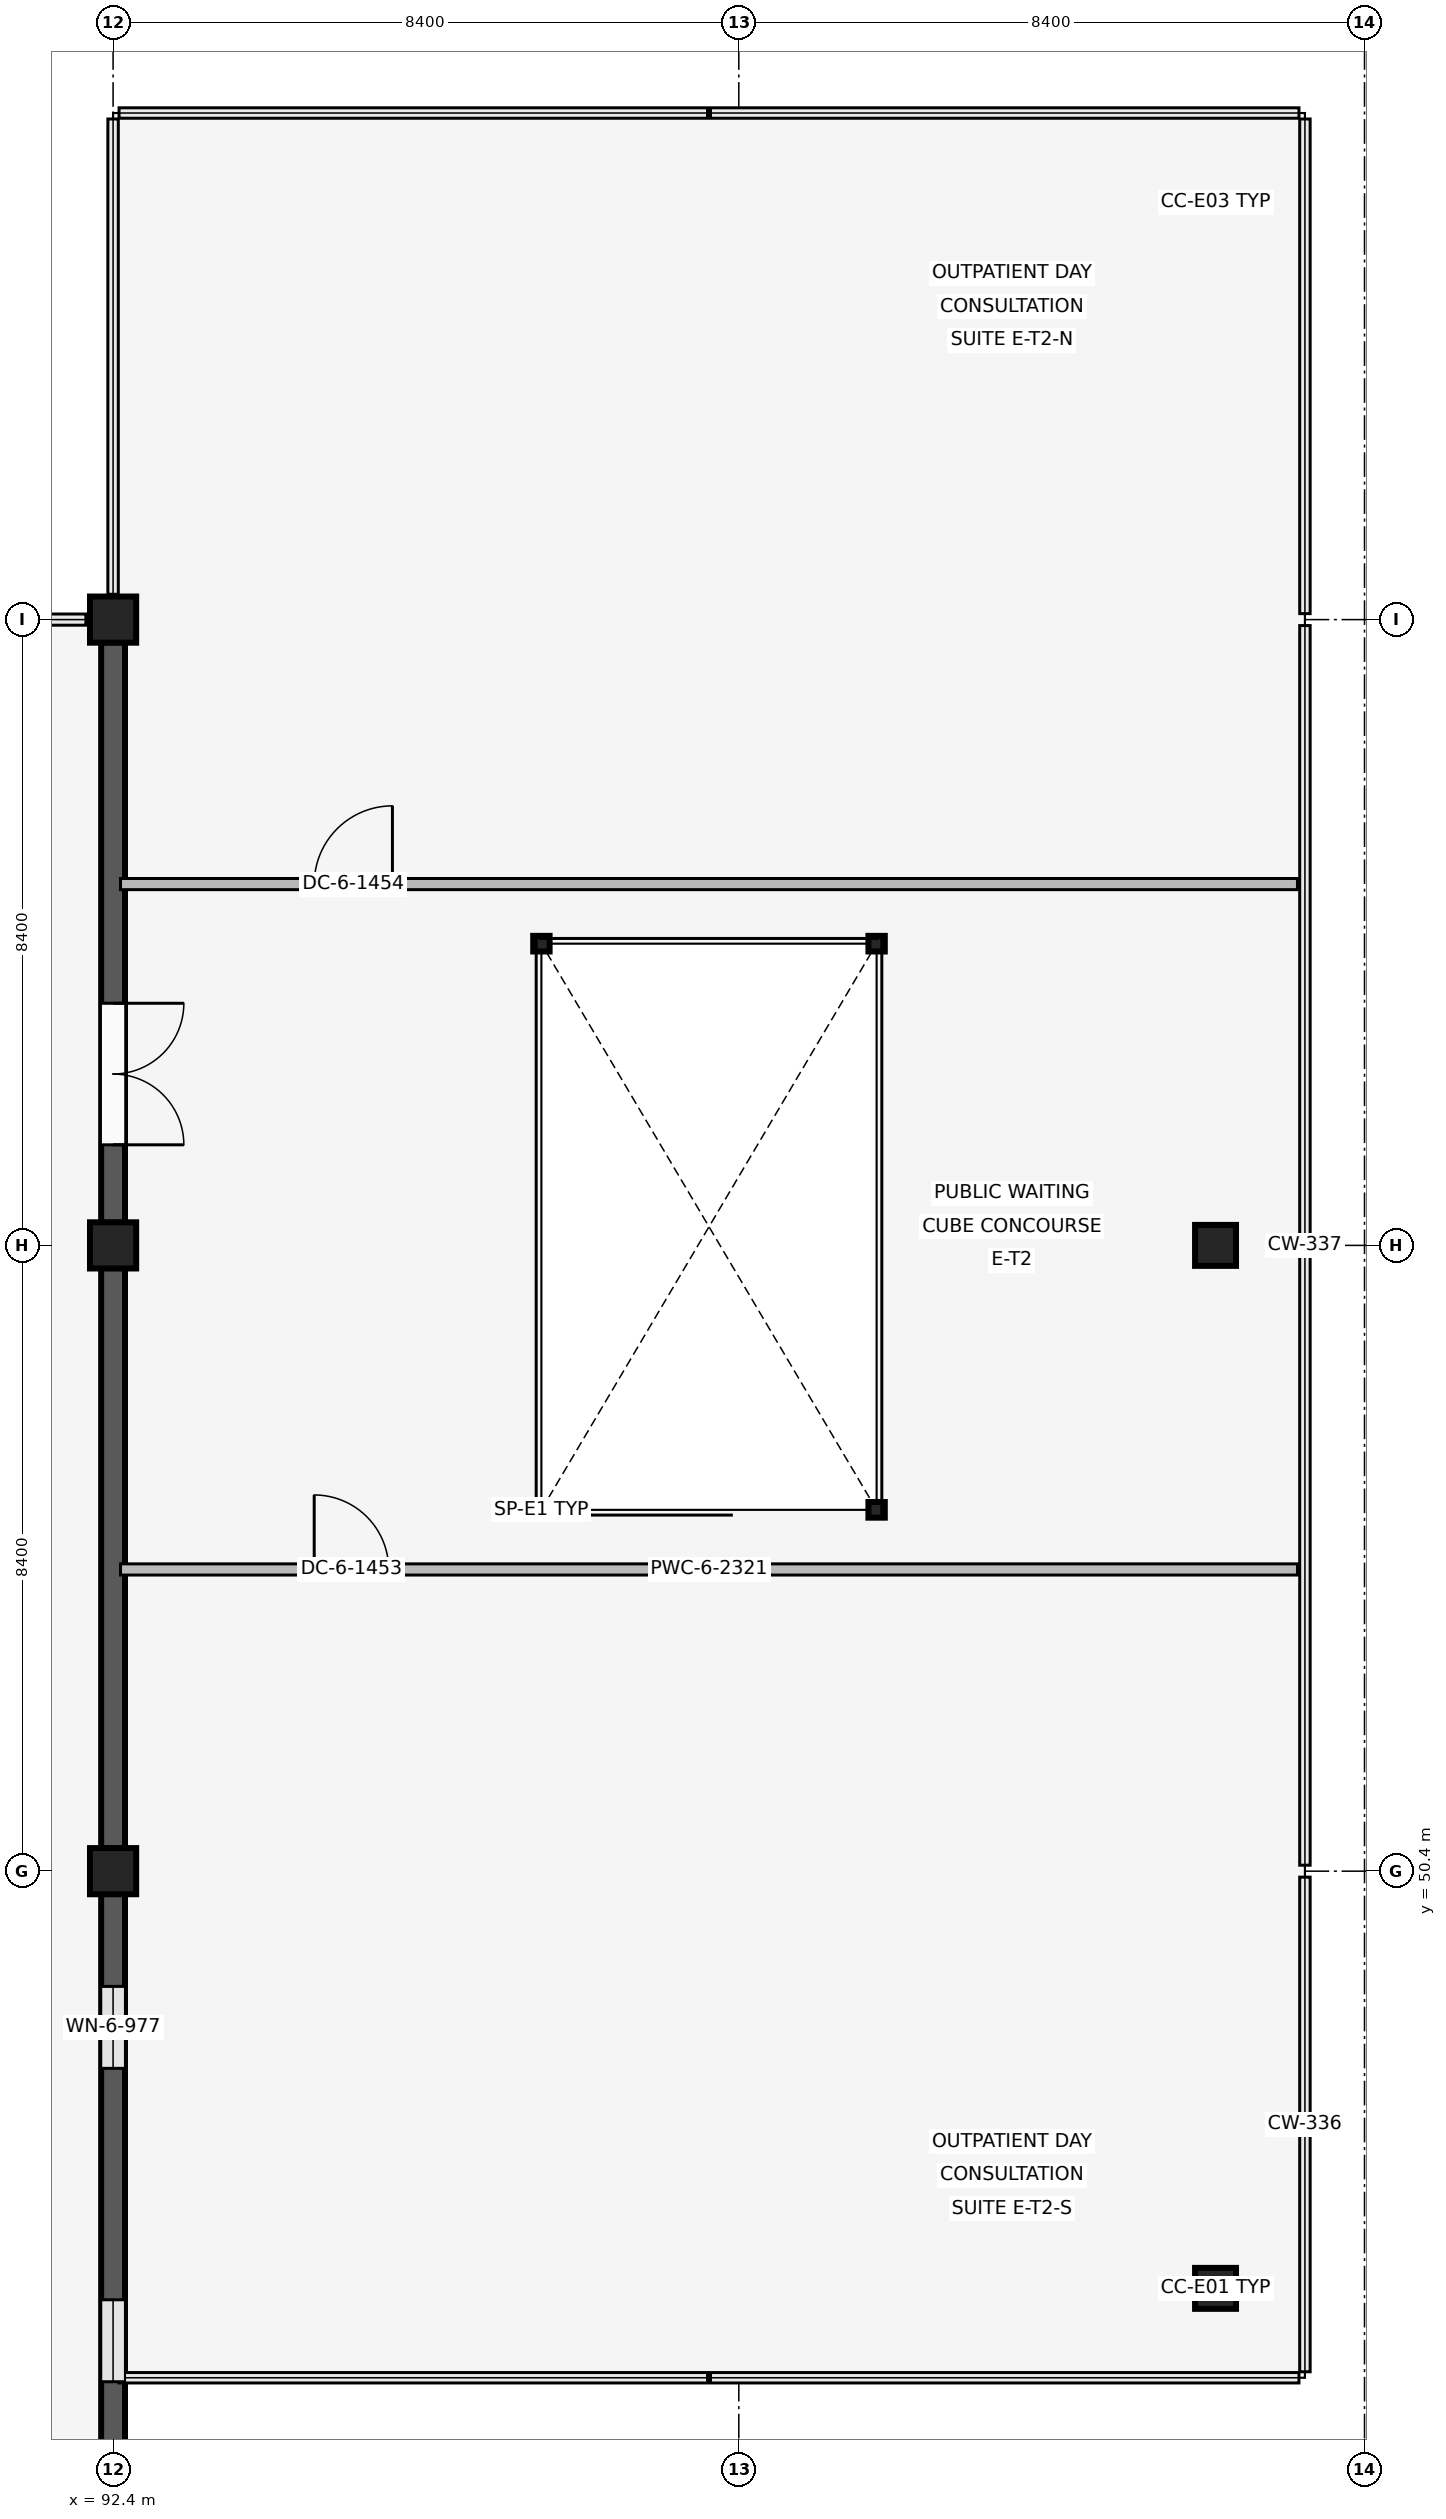
"""IFC4 building model, lengths in metres.
Left out: names, types, materials, properties, quantities, classifications, styles, units other than length and angle.
Written with IfcOpenShell. Run it as: python <this file> out.ifc"""

import sys

from ifc_helpers import new_model, si_unit, direction, frame, frame_2d, origin, origin_2d, place, context, subcontext, project, spatial, rectangle, i_section, extrude, element, fill, save


model = new_model("IFC4")
c1 = context("Model", 3, precision=1e-05, world=origin(), true_north=direction((0.0, 1.0)))
c2 = subcontext(c1, "Body", "Model", "MODEL_VIEW")
j1 = project(units=[si_unit("LENGTHUNIT", "METRE"), si_unit("PLANEANGLEUNIT", "RADIAN")], contexts=[c1])
p1 = place(None, origin())
s1 = spatial("IfcSite", under=j1, at=p1, CompositionType="ELEMENT")
p2 = place(p1, origin())
s2 = spatial("IfcBuilding", under=s1, at=p2, CompositionType="ELEMENT")
p3 = place(p2, frame((0.0, 0.0, 24.6)))
s3 = spatial("IfcBuildingStorey", under=s2, at=p3, CompositionType="ELEMENT", Elevation=24.6)
for number, where, z_axis, x_axis in (
    (1, (92.4, 50.4, 0.0), (0.0, 0.0, 1.0), (1.0, 0.0, 0.0)),
    (2, (92.4, 58.8, 0.0), (0.0, 0.0, 1.0), (1.0, 0.0, 0.0)),
    (3, (92.4, 67.2, 0.0), (0.0, 0.0, 1.0), (1.0, 0.0, 0.0)),
):
    element("IfcColumn", number, at=place(p3, frame(where, z_axis=z_axis, x_axis=x_axis)), inside=s3, PredefinedType="COLUMN", context=c2, shape_type="SweptSolid", body=[
        extrude(rectangle(XDim=0.62, YDim=0.62, at=origin_2d()), origin(), (0.0, 0.0, 1.0), 4.2),
    ])
for number, where, z_axis, x_axis in (
    (4, (107.2, 44.8, 0.0), (0.0, 0.0, 1.0), (1.0, 0.0, 0.0)),
    (5, (107.2, 58.8, 0.0), (0.0, 0.0, 1.0), (1.0, 0.0, 0.0)),
):
    element("IfcColumn", number, at=place(p3, frame(where, z_axis=z_axis, x_axis=x_axis)), inside=s3, PredefinedType="COLUMN", context=c2, shape_type="SweptSolid", body=[
        extrude(rectangle(XDim=0.55, YDim=0.55, at=origin_2d()), origin(), (0.0, 0.0, 1.0), 4.2),
    ])
p4 = place(p3, frame((107.2, 72.8, 0.0), z_axis=(0.0, 0.0, 1.0), x_axis=(1.0, 0.0, 0.0)))
e6 = element("IfcColumn", 6, at=p4, inside=s3, PredefinedType="COLUMN", context=c2, shape_type="SweptSolid", body=[
    extrude(i_section(OverallWidth=0.22, OverallDepth=0.22, WebThickness=0.01, FlangeThickness=0.016, at=origin_2d()), origin(), (0.0, 0.0, 1.0), 4.2),
])
for number, where, z_axis, x_axis in (
    (7, (98.15, 55.25, 0.0), (0.0, 0.0, 1.0), (1.0, 0.0, 0.0)),
    (8, (102.65, 55.25, 0.0), (0.0, 0.0, 1.0), (1.0, 0.0, 0.0)),
    (9, (98.15, 62.85, 0.0), (0.0, 0.0, 1.0), (1.0, 0.0, 0.0)),
    (10, (102.65, 62.85, 0.0), (0.0, 0.0, 1.0), (1.0, 0.0, 0.0)),
):
    element("IfcColumn", number, at=place(p3, frame(where, z_axis=z_axis, x_axis=x_axis)), inside=s3, PredefinedType="COLUMN", context=c2, shape_type="SweptSolid", body=[
        extrude(i_section(OverallWidth=0.22, OverallDepth=0.21, WebThickness=0.007, FlangeThickness=0.011, at=origin_2d()), origin(), (0.0, 0.0, 1.0), 4.2),
    ])
p5 = place(p3, frame((92.4, 50.095, 0.0), z_axis=(0.0, 0.0, 1.0), x_axis=(0.0, -1.0, 0.0)))
e11 = element("IfcWall", 11, at=p5, inside=s3, PredefinedType="SOLIDWALL", context=c2, shape_type="SweptSolid", body=[
    extrude(rectangle(XDim=7.79, YDim=0.32, at=frame_2d((3.895, 0.0))), origin(), (0.0, 0.0, 1.0), 3.34),
])
p6 = place(p5, frame((1.242, 0.0, 0.85)))
e12 = element("IfcOpeningElement", 12, at=p6, cuts=e11, PredefinedType="OPENING", context=c2, shape_type="SweptSolid", body=[
    extrude(rectangle(XDim=1.1, YDim=1.6, at=frame_2d((0.55, 0.8))), frame((0.0, 0.17, 0.0), z_axis=(0.0, -1.0, 0.0), x_axis=(1.0, 0.0, 0.0)), (0.0, 0.0, 1.0), 0.34),
])
p7 = place(p5, frame((5.448, 0.0, 0.85)))
e13 = element("IfcOpeningElement", 13, at=p7, cuts=e11, PredefinedType="OPENING", context=c2, shape_type="SweptSolid", body=[
    extrude(rectangle(XDim=1.1, YDim=1.6, at=frame_2d((0.55, 0.8))), frame((0.0, 0.17, 0.0), z_axis=(0.0, -1.0, 0.0), x_axis=(1.0, 0.0, 0.0)), (0.0, 0.0, 1.0), 0.34),
])
p8 = place(p3, frame((92.4, 58.495, 0.0), z_axis=(0.0, 0.0, 1.0), x_axis=(0.0, -1.0, 0.0)))
e14 = element("IfcWall", 14, at=p8, inside=s3, PredefinedType="SOLIDWALL", context=c2, shape_type="SweptSolid", body=[
    extrude(rectangle(XDim=7.79, YDim=0.32, at=frame_2d((3.895, 0.0))), origin(), (0.0, 0.0, 1.0), 3.34),
])
p9 = place(p3, frame((92.4, 66.895, 0.0), z_axis=(0.0, 0.0, 1.0), x_axis=(0.0, -1.0, 0.0)))
e15 = element("IfcWall", 15, at=p9, inside=s3, PredefinedType="SOLIDWALL", context=c2, shape_type="SweptSolid", body=[
    extrude(rectangle(XDim=7.79, YDim=0.32, at=frame_2d((3.895, 0.0))), origin(), (0.0, 0.0, 1.0), 3.34),
])
p10 = place(p9, frame((4.845, 0.0, 0.0)))
e16 = element("IfcOpeningElement", 16, at=p10, cuts=e15, PredefinedType="OPENING", context=c2, shape_type="SweptSolid", body=[
    extrude(rectangle(XDim=1.9, YDim=2.4, at=frame_2d((0.95, 1.2))), frame((0.0, 0.17, 0.0), z_axis=(0.0, -1.0, 0.0), x_axis=(1.0, 0.0, 0.0)), (0.0, 0.0, 1.0), 0.34),
])
p11 = place(p3, frame((92.5, 54.45, 0.0), z_axis=(0.0, 0.0, 1.0), x_axis=(1.0, 0.0, 0.0)))
e17 = element("IfcWall", 17, at=p11, inside=s3, PredefinedType="PARTITIONING", context=c2, shape_type="SweptSolid", body=[
    extrude(rectangle(XDim=15.8, YDim=0.15, at=frame_2d((7.9, 0.0))), origin(), (0.0, 0.0, 1.0), 3.49),
])
p12 = place(p11, frame((2.6, 0.0, 0.0)))
e18 = element("IfcOpeningElement", 18, at=p12, cuts=e17, PredefinedType="OPENING", context=c2, shape_type="SweptSolid", body=[
    extrude(rectangle(XDim=1.0, YDim=2.15, at=frame_2d((0.5, 1.075))), frame((0.0, 0.085, 0.0), z_axis=(0.0, -1.0, 0.0), x_axis=(1.0, 0.0, 0.0)), (0.0, 0.0, 1.0), 0.17),
])
p13 = place(p3, frame((92.5, 63.65, 0.0), z_axis=(0.0, 0.0, 1.0), x_axis=(1.0, 0.0, 0.0)))
e19 = element("IfcWall", 19, at=p13, inside=s3, PredefinedType="PARTITIONING", context=c2, shape_type="SweptSolid", body=[
    extrude(rectangle(XDim=15.8, YDim=0.15, at=frame_2d((7.9, 0.0))), origin(), (0.0, 0.0, 1.0), 3.49),
])
p14 = place(p13, frame((2.6, 0.0, 0.0)))
e20 = element("IfcOpeningElement", 20, at=p14, cuts=e19, PredefinedType="OPENING", context=c2, shape_type="SweptSolid", body=[
    extrude(rectangle(XDim=1.05, YDim=2.2, at=frame_2d((0.525, 1.1))), frame((0.0, 0.085, 0.0), z_axis=(0.0, -1.0, 0.0), x_axis=(1.0, 0.0, 0.0)), (0.0, 0.0, 1.0), 0.17),
])
p15 = place(p6, origin())
e21 = element("IfcWindow", 21, at=p15, inside=s3, PartitioningType="SINGLE_PANEL", PredefinedType="WINDOW", context=c2, shape_type="SweptSolid", body=[
    extrude(rectangle(XDim=1.1, YDim=1.6, at=frame_2d((0.55, 0.8))), frame((0.0, 0.03, 0.0), z_axis=(0.0, -1.0, 0.0), x_axis=(1.0, 0.0, 0.0)), (0.0, 0.0, 1.0), 0.06),
])
fill(e12, e21)
p16 = place(p7, origin())
e22 = element("IfcWindow", 22, at=p16, inside=s3, PartitioningType="SINGLE_PANEL", PredefinedType="WINDOW", context=c2, shape_type="SweptSolid", body=[
    extrude(rectangle(XDim=1.1, YDim=1.6, at=frame_2d((0.55, 0.8))), frame((0.0, 0.03, 0.0), z_axis=(0.0, -1.0, 0.0), x_axis=(1.0, 0.0, 0.0)), (0.0, 0.0, 1.0), 0.06),
])
fill(e13, e22)
p17 = place(p10, origin())
e23 = element("IfcDoor", 23, at=p17, inside=s3, OperationType="DOUBLE_SWING_LEFT", PredefinedType="DOOR", context=c2, shape_type="SweptSolid", body=[
    extrude(rectangle(XDim=1.9, YDim=2.4, at=frame_2d((0.95, 1.2))), frame((0.0, 0.025, 0.0), z_axis=(0.0, -1.0, 0.0), x_axis=(1.0, 0.0, 0.0)), (0.0, 0.0, 1.0), 0.05),
])
fill(e16, e23)
p18 = place(p12, origin())
e24 = element("IfcDoor", 24, at=p18, inside=s3, OperationType="SINGLE_SWING_LEFT", PredefinedType="DOOR", context=c2, shape_type="SweptSolid", body=[
    extrude(rectangle(XDim=1.0, YDim=2.15, at=frame_2d((0.5, 1.075))), frame((0.0, 0.025, 0.0), z_axis=(0.0, -1.0, 0.0), x_axis=(1.0, 0.0, 0.0)), (0.0, 0.0, 1.0), 0.05),
])
fill(e18, e24)
p19 = place(p14, origin())
e25 = element("IfcDoor", 25, at=p19, inside=s3, OperationType="SINGLE_SWING_RIGHT", PredefinedType="DOOR", context=c2, shape_type="SweptSolid", body=[
    extrude(rectangle(XDim=1.05, YDim=2.2, at=frame_2d((0.525, 1.1))), frame((0.0, 0.025, 0.0), z_axis=(0.0, -1.0, 0.0), x_axis=(1.0, 0.0, 0.0)), (0.0, 0.0, 1.0), 0.05),
])
fill(e20, e25)
save(model, sys.argv[1])
